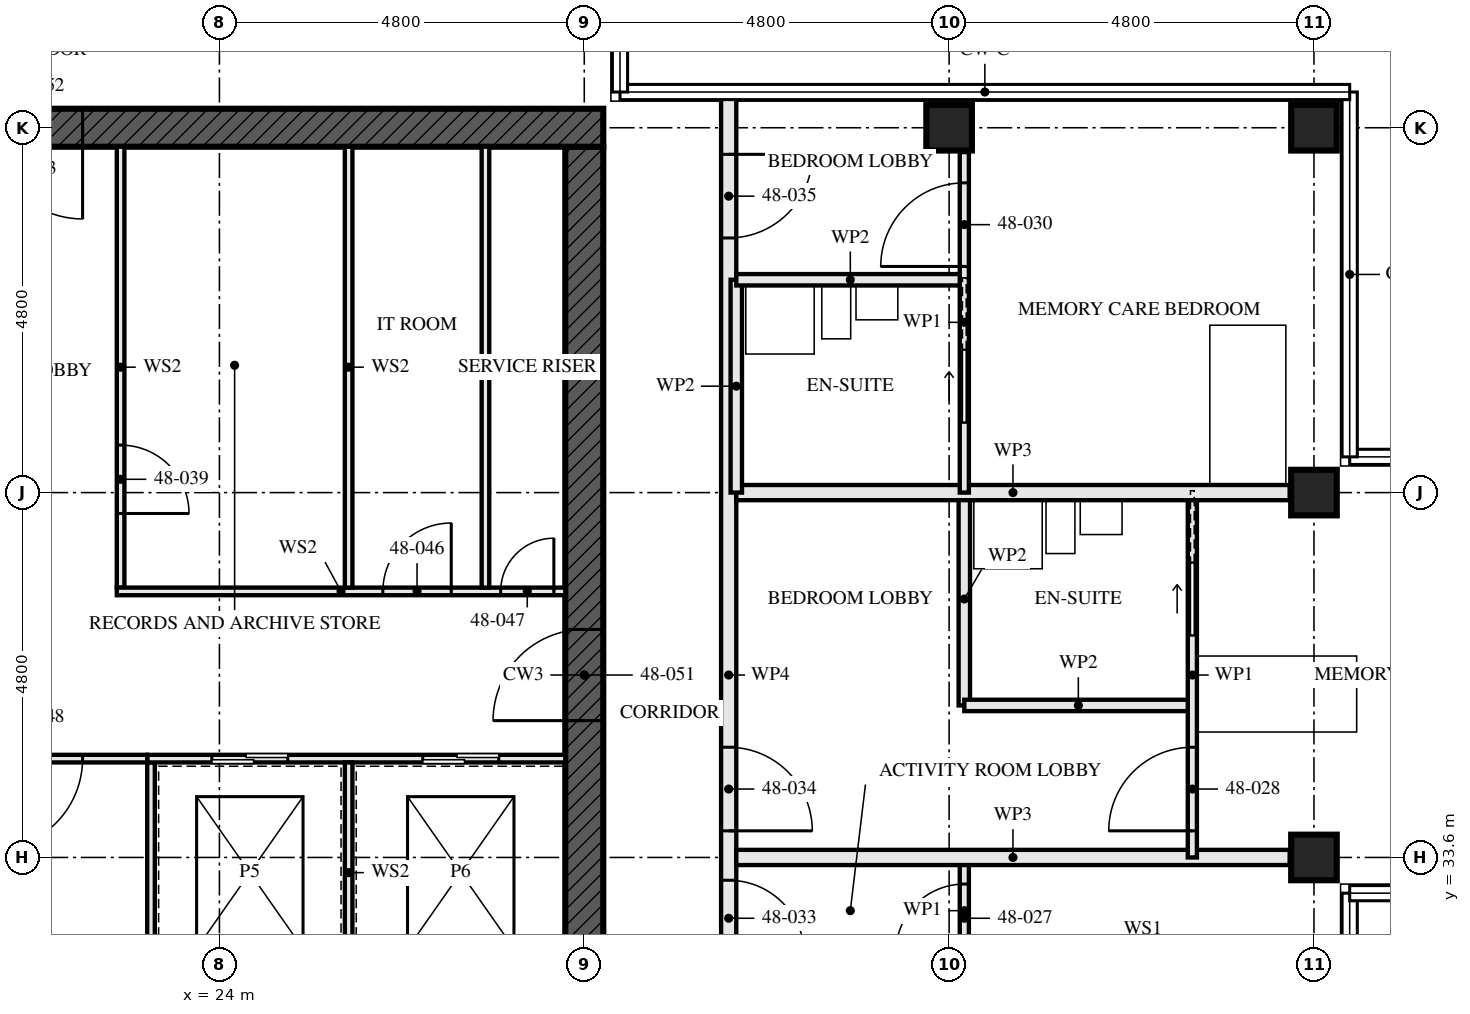
"""IFC4 building model, lengths in metres.
Left out: names, types, materials, properties, quantities, classifications, styles, units other than length and angle.
Written with IfcOpenShell. Run it as: python <this file> out.ifc"""

import sys

from ifc_helpers import new_model, si_unit, direction, frame, frame_2d, origin, origin_2d, place, context, subcontext, project, spatial, rectangle, hollow_rectangle, extrude, element, fill, save


model = new_model("IFC4")
c1 = context("Model", 3, precision=1e-05, world=origin(), true_north=direction((0.0, 1.0)))
c2 = subcontext(c1, "Body", "Model", "MODEL_VIEW")
j1 = project(units=[si_unit("LENGTHUNIT", "METRE"), si_unit("PLANEANGLEUNIT", "RADIAN")], contexts=[c1])
p1 = place(None, origin())
s1 = spatial("IfcSite", under=j1, at=p1, CompositionType="ELEMENT")
p2 = place(p1, origin())
s2 = spatial("IfcBuilding", under=s1, at=p2, CompositionType="ELEMENT")
p3 = place(p2, frame((0.0, 0.0, 176.0)))
s3 = spatial("IfcBuildingStorey", under=s2, at=p3, CompositionType="ELEMENT", Elevation=176.0)
for number, where, z_axis, x_axis in (
    (1, (33.6, 43.2, 0.0), (0.0, 0.0, 1.0), (0.0, 1.0, 0.0)),
    (2, (38.4, 33.6, 0.0), (0.0, 0.0, 1.0), (0.0, 1.0, 0.0)),
    (3, (38.4, 38.4, 0.0), (0.0, 0.0, 1.0), (0.0, 1.0, 0.0)),
    (4, (38.4, 43.2, 0.0), (0.0, 0.0, 1.0), (0.0, 1.0, 0.0)),
):
    element("IfcColumn", number, at=place(p3, frame(where, z_axis=z_axis, x_axis=x_axis)), inside=s3, PredefinedType="COLUMN", context=c2, shape_type="SweptSolid", body=[
        extrude(hollow_rectangle(XDim=0.6, YDim=0.6, WallThickness=0.08, at=origin_2d()), origin(), (0.0, 0.0, 1.0), 3.5),
    ])
p4 = place(p3, frame((29.05, 43.2, -0.17), z_axis=(0.0, 0.0, 1.0), x_axis=(-1.0, 0.0, 0.0)))
e5 = element("IfcWall", 5, at=p4, inside=s3, PredefinedType="SHEAR", context=c2, shape_type="SweptSolid", body=[
    extrude(rectangle(XDim=14.9, YDim=0.5, at=frame_2d((7.45, 0.0))), origin(), (0.0, 0.0, 1.0), 3.5),
])
p5 = place(p4, frame((6.85, 0.0, 0.17)))
e6 = element("IfcOpeningElement", 6, at=p5, cuts=e5, PredefinedType="OPENING", context=c2, shape_type="SweptSolid", body=[
    extrude(rectangle(XDim=1.2, YDim=2.1, at=frame_2d((0.6, 1.05))), frame((0.0, 0.26, 0.0), z_axis=(0.0, -1.0, 0.0), x_axis=(1.0, 0.0, 0.0)), (0.0, 0.0, 1.0), 0.521),
])
p6 = place(p3, frame((28.8, 29.05, -0.17), z_axis=(0.0, 0.0, 1.0), x_axis=(0.0, 1.0, 0.0)))
e7 = element("IfcWall", 7, at=p6, inside=s3, PredefinedType="SHEAR", context=c2, shape_type="SweptSolid", body=[
    extrude(rectangle(XDim=13.9, YDim=0.5, at=frame_2d((6.95, 0.0))), origin(), (0.0, 0.0, 1.0), 3.5),
])
p7 = place(p6, frame((6.35, 0.0, 0.17)))
e8 = element("IfcOpeningElement", 8, at=p7, cuts=e7, PredefinedType="OPENING", context=c2, shape_type="SweptSolid", body=[
    extrude(rectangle(XDim=1.2, YDim=2.1, at=frame_2d((0.6, 1.05))), frame((0.0, 0.26, 0.0), z_axis=(0.0, -1.0, 0.0), x_axis=(1.0, 0.0, 0.0)), (0.0, 0.0, 1.0), 0.521),
])
p8 = place(p3, frame((33.8, 32.2, 0.0), z_axis=(0.0, 0.0, 1.0), x_axis=(0.0, 1.0, 0.0)))
e9 = element("IfcWall", 9, at=p8, inside=s3, PredefinedType="PARTITIONING", context=c2, shape_type="SweptSolid", body=[
    extrude(rectangle(XDim=1.4, YDim=0.12, at=frame_2d((0.7, 0.0))), origin(), (0.0, 0.0, 1.0), 3.33),
])
p9 = place(p8, frame((0.15, 0.0, 0.0)))
e10 = element("IfcOpeningElement", 10, at=p9, cuts=e9, PredefinedType="OPENING", context=c2, shape_type="SweptSolid", body=[
    extrude(rectangle(XDim=0.9, YDim=2.1, at=frame_2d((0.45, 1.05))), frame((0.0, 0.071, 0.0), z_axis=(0.0, -1.0, 0.0), x_axis=(1.0, 0.0, 0.0)), (0.0, 0.0, 1.0), 0.141),
])
p10 = place(p3, frame((38.08, 33.6, 0.0), z_axis=(0.0, 0.0, 1.0), x_axis=(-1.0, 0.0, 0.0)))
e11 = element("IfcWall", 11, at=p10, inside=s3, PredefinedType="PARTITIONING", context=c2, shape_type="SweptSolid", body=[
    extrude(rectangle(XDim=7.28, YDim=0.2, at=frame_2d((3.64, 0.0))), origin(), (0.0, 0.0, 1.0), 2.55),
])
p11 = place(p3, frame((36.8, 35.6, 0.0), z_axis=(0.0, 0.0, 1.0), x_axis=(-1.0, 0.0, 0.0)))
e12 = element("IfcWall", 12, at=p11, inside=s3, PredefinedType="PARTITIONING", context=c2, shape_type="SweptSolid", body=[
    extrude(rectangle(XDim=3.0, YDim=0.15, at=frame_2d((1.5, 0.0))), origin(), (0.0, 0.0, 1.0), 3.33),
])
p12 = place(p3, frame((33.8, 35.6, 0.0), z_axis=(0.0, 0.0, 1.0), x_axis=(0.0, 1.0, 0.0)))
e13 = element("IfcWall", 13, at=p12, inside=s3, PredefinedType="PARTITIONING", context=c2, shape_type="SweptSolid", body=[
    extrude(rectangle(XDim=2.8, YDim=0.15, at=frame_2d((1.4, 0.0))), origin(), (0.0, 0.0, 1.0), 3.33),
])
p13 = place(p3, frame((36.8, 33.6, 0.0), z_axis=(0.0, 0.0, 1.0), x_axis=(0.0, 1.0, 0.0)))
e14 = element("IfcWall", 14, at=p13, inside=s3, PredefinedType="PARTITIONING", context=c2, shape_type="SweptSolid", body=[
    extrude(rectangle(XDim=4.8, YDim=0.12, at=frame_2d((2.4, 0.0))), origin(), (0.0, 0.0, 1.0), 3.33),
])
p14 = place(p13, frame((0.35, 0.0, 0.0)))
e15 = element("IfcOpeningElement", 15, at=p14, cuts=e14, PredefinedType="OPENING", context=c2, shape_type="SweptSolid", body=[
    extrude(rectangle(XDim=1.1, YDim=2.1, at=frame_2d((0.55, 1.05))), frame((0.0, 0.071, 0.0), z_axis=(0.0, -1.0, 0.0), x_axis=(1.0, 0.0, 0.0)), (0.0, 0.0, 1.0), 0.141),
])
p15 = place(p13, frame((2.925, 0.0, 0.0)))
e16 = element("IfcOpeningElement", 16, at=p15, cuts=e14, PredefinedType="OPENING", context=c2, shape_type="SweptSolid", body=[
    extrude(rectangle(XDim=0.95, YDim=2.1, at=frame_2d((0.475, 1.05))), frame((0.0, 0.071, 0.0), z_axis=(0.0, -1.0, 0.0), x_axis=(1.0, 0.0, 0.0)), (0.0, 0.0, 1.0), 0.141),
])
p16 = place(p3, frame((38.08, 38.4, 0.0), z_axis=(0.0, 0.0, 1.0), x_axis=(-1.0, 0.0, 0.0)))
e17 = element("IfcWall", 17, at=p16, inside=s3, PredefinedType="PARTITIONING", context=c2, shape_type="SweptSolid", body=[
    extrude(rectangle(XDim=7.28, YDim=0.2, at=frame_2d((3.64, 0.0))), origin(), (0.0, 0.0, 1.0), 2.55),
])
p17 = place(p3, frame((33.8, 41.2, 0.0), z_axis=(0.0, 0.0, 1.0), x_axis=(-1.0, 0.0, 0.0)))
e18 = element("IfcWall", 18, at=p17, inside=s3, PredefinedType="PARTITIONING", context=c2, shape_type="SweptSolid", body=[
    extrude(rectangle(XDim=3.0, YDim=0.15, at=frame_2d((1.5, 0.0))), origin(), (0.0, 0.0, 1.0), 3.33),
])
p18 = place(p3, frame((30.8, 38.4, 0.0), z_axis=(0.0, 0.0, 1.0), x_axis=(0.0, 1.0, 0.0)))
e19 = element("IfcWall", 19, at=p18, inside=s3, PredefinedType="PARTITIONING", context=c2, shape_type="SweptSolid", body=[
    extrude(rectangle(XDim=2.8, YDim=0.15, at=frame_2d((1.4, 0.0))), origin(), (0.0, 0.0, 1.0), 3.33),
])
p19 = place(p3, frame((33.8, 38.4, 0.0), z_axis=(0.0, 0.0, 1.0), x_axis=(0.0, 1.0, 0.0)))
e20 = element("IfcWall", 20, at=p19, inside=s3, PredefinedType="PARTITIONING", context=c2, shape_type="SweptSolid", body=[
    extrude(rectangle(XDim=4.48, YDim=0.12, at=frame_2d((2.24, 0.0))), origin(), (0.0, 0.0, 1.0), 3.33),
])
p20 = place(p19, frame((2.975, 0.0, 0.0)))
e21 = element("IfcOpeningElement", 21, at=p20, cuts=e20, PredefinedType="OPENING", context=c2, shape_type="SweptSolid", body=[
    extrude(rectangle(XDim=1.1, YDim=2.1, at=frame_2d((0.55, 1.05))), frame((0.0, 0.071, 0.0), z_axis=(0.0, -1.0, 0.0), x_axis=(1.0, 0.0, 0.0)), (0.0, 0.0, 1.0), 0.141),
])
p21 = place(p19, frame((0.925, 0.0, 0.0)))
e22 = element("IfcOpeningElement", 22, at=p21, cuts=e20, PredefinedType="OPENING", context=c2, shape_type="SweptSolid", body=[
    extrude(rectangle(XDim=0.95, YDim=2.1, at=frame_2d((0.475, 1.05))), frame((0.0, 0.071, 0.0), z_axis=(0.0, -1.0, 0.0), x_axis=(1.0, 0.0, 0.0)), (0.0, 0.0, 1.0), 0.141),
])
p22 = place(p3, frame((30.7, 28.35, 0.0), z_axis=(0.0, 0.0, 1.0), x_axis=(0.0, 1.0, 0.0)))
e23 = element("IfcWall", 23, at=p22, inside=s3, PredefinedType="PARTITIONING", context=c2, shape_type="SweptSolid", body=[
    extrude(rectangle(XDim=15.3, YDim=0.2, at=frame_2d((7.65, 0.0))), origin(), (0.0, 0.0, 1.0), 2.32),
])
p23 = place(p22, frame((1.85, 0.0, 0.0)))
e24 = element("IfcOpeningElement", 24, at=p23, cuts=e23, PredefinedType="OPENING", context=c2, shape_type="SweptSolid", body=[
    extrude(rectangle(XDim=1.0, YDim=2.1, at=frame_2d((0.5, 1.05))), frame((0.0, 0.111, 0.0), z_axis=(0.0, -1.0, 0.0), x_axis=(1.0, 0.0, 0.0)), (0.0, 0.0, 1.0), 0.221),
])
p24 = place(p22, frame((3.95, 0.0, 0.0)))
e25 = element("IfcOpeningElement", 25, at=p24, cuts=e23, PredefinedType="OPENING", context=c2, shape_type="SweptSolid", body=[
    extrude(rectangle(XDim=1.0, YDim=2.1, at=frame_2d((0.5, 1.05))), frame((0.0, 0.111, 0.0), z_axis=(0.0, -1.0, 0.0), x_axis=(1.0, 0.0, 0.0)), (0.0, 0.0, 1.0), 0.221),
])
p25 = place(p22, frame((5.6, 0.0, 0.0)))
e26 = element("IfcOpeningElement", 26, at=p25, cuts=e23, PredefinedType="OPENING", context=c2, shape_type="SweptSolid", body=[
    extrude(rectangle(XDim=1.1, YDim=2.1, at=frame_2d((0.55, 1.05))), frame((0.0, 0.111, 0.0), z_axis=(0.0, -1.0, 0.0), x_axis=(1.0, 0.0, 0.0)), (0.0, 0.0, 1.0), 0.221),
])
p26 = place(p22, frame((13.4, 0.0, 0.0)))
e27 = element("IfcOpeningElement", 27, at=p26, cuts=e23, PredefinedType="OPENING", context=c2, shape_type="SweptSolid", body=[
    extrude(rectangle(XDim=1.1, YDim=2.1, at=frame_2d((0.55, 1.05))), frame((0.0, 0.111, 0.0), z_axis=(0.0, -1.0, 0.0), x_axis=(1.0, 0.0, 0.0)), (0.0, 0.0, 1.0), 0.221),
])
p27 = place(p3, frame((27.5, 37.15, 0.0), z_axis=(0.0, 0.0, 1.0), x_axis=(0.0, 1.0, 0.0)))
e28 = element("IfcWall", 28, at=p27, inside=s3, PredefinedType="SOLIDWALL", context=c2, shape_type="SweptSolid", body=[
    extrude(rectangle(XDim=5.8, YDim=0.1, at=frame_2d((2.9, 0.0))), origin(), (0.0, 0.0, 1.0), 3.33),
])
p28 = place(p3, frame((22.7, 37.15, 0.0), z_axis=(0.0, 0.0, 1.0), x_axis=(0.0, 1.0, 0.0)))
e29 = element("IfcWall", 29, at=p28, inside=s3, PredefinedType="SOLIDWALL", context=c2, shape_type="SweptSolid", body=[
    extrude(rectangle(XDim=5.8, YDim=0.1, at=frame_2d((2.9, 0.0))), origin(), (0.0, 0.0, 1.0), 3.33),
])
p29 = place(p28, frame((0.975, 0.0, 0.0)))
e30 = element("IfcOpeningElement", 30, at=p29, cuts=e29, PredefinedType="OPENING", context=c2, shape_type="SweptSolid", body=[
    extrude(rectangle(XDim=0.9, YDim=2.1, at=frame_2d((0.45, 1.05))), frame((0.0, 0.061, 0.0), z_axis=(0.0, -1.0, 0.0), x_axis=(1.0, 0.0, 0.0)), (0.0, 0.0, 1.0), 0.121),
])
p30 = place(p3, frame((23.1, 29.05, 0.0), z_axis=(0.0, 0.0, 1.0), x_axis=(0.0, 1.0, 0.0)))
e31 = element("IfcWall", 31, at=p30, inside=s3, PredefinedType="SOLIDWALL", context=c2, shape_type="SweptSolid", body=[
    extrude(rectangle(XDim=5.8, YDim=0.1, at=frame_2d((2.9, 0.0))), origin(), (0.0, 0.0, 1.0), 3.33),
])
p31 = place(p30, frame((1.0, 0.0, 0.0)))
e32 = element("IfcOpeningElement", 32, at=p31, cuts=e31, PredefinedType="OPENING", context=c2, shape_type="SweptSolid", body=[
    extrude(rectangle(XDim=0.7, YDim=2.1, at=frame_2d((0.35, 1.05))), frame((0.0, 0.061, 0.0), z_axis=(0.0, -1.0, 0.0), x_axis=(1.0, 0.0, 0.0)), (0.0, 0.0, 1.0), 0.121),
])
p32 = place(p3, frame((23.05, 34.9, 0.0), z_axis=(0.0, 0.0, 1.0), x_axis=(1.0, 0.0, 0.0)))
e33 = element("IfcWall", 33, at=p32, inside=s3, PredefinedType="SOLIDWALL", context=c2, shape_type="SweptSolid", body=[
    extrude(rectangle(XDim=5.5, YDim=0.1, at=frame_2d((2.75, 0.0))), origin(), (0.0, 0.0, 1.0), 3.33),
])
p33 = place(p32, frame((0.85, 0.0, 0.0)))
e34 = element("IfcOpeningElement", 34, at=p33, cuts=e33, PredefinedType="OPENING", context=c2, shape_type="SweptSolid", body=[
    extrude(rectangle(XDim=1.0, YDim=2.1, at=frame_2d((0.5, 1.05))), frame((0.0, 0.061, 0.0), z_axis=(0.0, -1.0, 0.0), x_axis=(1.0, 0.0, 0.0)), (0.0, 0.0, 1.0), 0.121),
])
p34 = place(p32, frame((3.625, 0.0, 0.0)))
e35 = element("IfcOpeningElement", 35, at=p34, cuts=e33, PredefinedType="OPENING", context=c2, shape_type="SweptSolid", body=[
    extrude(rectangle(XDim=1.0, YDim=2.1, at=frame_2d((0.5, 1.05))), frame((0.0, 0.061, 0.0), z_axis=(0.0, -1.0, 0.0), x_axis=(1.0, 0.0, 0.0)), (0.0, 0.0, 1.0), 0.121),
])
p35 = place(p3, frame((22.65, 37.1, 0.0), z_axis=(0.0, 0.0, 1.0), x_axis=(1.0, 0.0, 0.0)))
e36 = element("IfcWall", 36, at=p35, inside=s3, PredefinedType="SOLIDWALL", context=c2, shape_type="SweptSolid", body=[
    extrude(rectangle(XDim=5.9, YDim=0.1, at=frame_2d((2.95, 0.0))), origin(), (0.0, 0.0, 1.0), 3.33),
])
p36 = place(p35, frame((3.5, 0.0, 0.0)))
e37 = element("IfcOpeningElement", 37, at=p36, cuts=e36, PredefinedType="OPENING", context=c2, shape_type="SweptSolid", body=[
    extrude(rectangle(XDim=0.9, YDim=2.1, at=frame_2d((0.45, 1.05))), frame((0.0, 0.061, 0.0), z_axis=(0.0, -1.0, 0.0), x_axis=(1.0, 0.0, 0.0)), (0.0, 0.0, 1.0), 0.121),
])
p37 = place(p35, frame((5.05, 0.0, 0.0)))
e38 = element("IfcOpeningElement", 38, at=p37, cuts=e36, PredefinedType="OPENING", context=c2, shape_type="SweptSolid", body=[
    extrude(rectangle(XDim=0.7, YDim=2.1, at=frame_2d((0.35, 1.05))), frame((0.0, 0.061, 0.0), z_axis=(0.0, -1.0, 0.0), x_axis=(1.0, 0.0, 0.0)), (0.0, 0.0, 1.0), 0.121),
])
p38 = place(p3, frame((20.55, 34.9, 0.0), z_axis=(0.0, 0.0, 1.0), x_axis=(1.0, 0.0, 0.0)))
e39 = element("IfcWall", 39, at=p38, inside=s3, PredefinedType="SOLIDWALL", context=c2, shape_type="SweptSolid", body=[
    extrude(rectangle(XDim=2.5, YDim=0.1, at=frame_2d((1.25, 0.0))), origin(), (0.0, 0.0, 1.0), 3.33),
])
p39 = place(p38, frame((0.45, 0.0, 0.0)))
e40 = element("IfcOpeningElement", 40, at=p39, cuts=e39, PredefinedType="OPENING", context=c2, shape_type="SweptSolid", body=[
    extrude(rectangle(XDim=1.2, YDim=2.1, at=frame_2d((0.6, 1.05))), frame((0.0, 0.061, 0.0), z_axis=(0.0, -1.0, 0.0), x_axis=(1.0, 0.0, 0.0)), (0.0, 0.0, 1.0), 0.121),
])
p40 = place(p3, frame((25.7, 37.15, 0.0), z_axis=(0.0, 0.0, 1.0), x_axis=(0.0, 1.0, 0.0)))
e41 = element("IfcWall", 41, at=p40, inside=s3, PredefinedType="SOLIDWALL", context=c2, shape_type="SweptSolid", body=[
    extrude(rectangle(XDim=5.8, YDim=0.1, at=frame_2d((2.9, 0.0))), origin(), (0.0, 0.0, 1.0), 3.33),
])
p41 = place(p3, frame((25.7, 31.95, 0.0), z_axis=(0.0, 0.0, 1.0), x_axis=(0.0, 1.0, 0.0)))
e42 = element("IfcWall", 42, at=p41, inside=s3, PredefinedType="SOLIDWALL", context=c2, shape_type="SweptSolid", body=[
    extrude(rectangle(XDim=2.9, YDim=0.1, at=frame_2d((1.45, 0.0))), origin(), (0.0, 0.0, 1.0), 3.33),
])
p42 = place(p9, origin())
e43 = element("IfcDoor", 43, at=p42, inside=s3, OperationType="SINGLE_SWING_RIGHT", PredefinedType="DOOR", context=c2, shape_type="SweptSolid", body=[
    extrude(rectangle(XDim=0.9, YDim=2.1, at=frame_2d((0.45, 1.05))), frame((0.0, 0.022, 0.0), z_axis=(0.0, -1.0, 0.0), x_axis=(1.0, 0.0, 0.0)), (0.0, 0.0, 1.0), 0.044),
])
fill(e10, e43)
p43 = place(p14, origin())
e44 = element("IfcDoor", 44, at=p43, inside=s3, OperationType="SINGLE_SWING_RIGHT", PredefinedType="DOOR", context=c2, shape_type="SweptSolid", body=[
    extrude(rectangle(XDim=1.1, YDim=2.1, at=frame_2d((0.55, 1.05))), frame((0.0, 0.022, 0.0), z_axis=(0.0, -1.0, 0.0), x_axis=(1.0, 0.0, 0.0)), (0.0, 0.0, 1.0), 0.044),
])
fill(e15, e44)
p44 = place(p15, origin())
e45 = element("IfcDoor", 45, at=p44, inside=s3, OperationType="SLIDING_TO_LEFT", PredefinedType="DOOR", context=c2, shape_type="SweptSolid", body=[
    extrude(rectangle(XDim=0.95, YDim=2.1, at=frame_2d((0.475, 1.05))), frame((0.0, 0.022, 0.0), z_axis=(0.0, -1.0, 0.0), x_axis=(1.0, 0.0, 0.0)), (0.0, 0.0, 1.0), 0.044),
])
fill(e16, e45)
p45 = place(p20, origin())
e46 = element("IfcDoor", 46, at=p45, inside=s3, OperationType="SINGLE_SWING_RIGHT", PredefinedType="DOOR", context=c2, shape_type="SweptSolid", body=[
    extrude(rectangle(XDim=1.1, YDim=2.1, at=frame_2d((0.55, 1.05))), frame((0.0, 0.022, 0.0), z_axis=(0.0, -1.0, 0.0), x_axis=(1.0, 0.0, 0.0)), (0.0, 0.0, 1.0), 0.044),
])
fill(e21, e46)
p46 = place(p21, origin())
e47 = element("IfcDoor", 47, at=p46, inside=s3, OperationType="SLIDING_TO_LEFT", PredefinedType="DOOR", context=c2, shape_type="SweptSolid", body=[
    extrude(rectangle(XDim=0.95, YDim=2.1, at=frame_2d((0.475, 1.05))), frame((0.0, 0.022, 0.0), z_axis=(0.0, -1.0, 0.0), x_axis=(1.0, 0.0, 0.0)), (0.0, 0.0, 1.0), 0.044),
])
fill(e22, e47)
p47 = place(p24, frame((1.0, 0.0, 0.0), z_axis=(0.0, 0.0, 1.0), x_axis=(-1.0, 0.0, 0.0)))
e48 = element("IfcDoor", 48, at=p47, inside=s3, OperationType="SINGLE_SWING_LEFT", PredefinedType="DOOR", context=c2, shape_type="SweptSolid", body=[
    extrude(rectangle(XDim=1.0, YDim=2.1, at=frame_2d((0.5, 1.05))), frame((0.0, 0.027, 0.0), z_axis=(0.0, -1.0, 0.0), x_axis=(1.0, 0.0, 0.0)), (0.0, 0.0, 1.0), 0.054),
])
fill(e25, e48)
p48 = place(p25, frame((1.1, 0.0, 0.0), z_axis=(0.0, 0.0, 1.0), x_axis=(-1.0, 0.0, 0.0)))
e49 = element("IfcDoor", 49, at=p48, inside=s3, OperationType="SINGLE_SWING_LEFT", PredefinedType="DOOR", context=c2, shape_type="SweptSolid", body=[
    extrude(rectangle(XDim=1.1, YDim=2.1, at=frame_2d((0.55, 1.05))), frame((0.0, 0.027, 0.0), z_axis=(0.0, -1.0, 0.0), x_axis=(1.0, 0.0, 0.0)), (0.0, 0.0, 1.0), 0.054),
])
fill(e26, e49)
p49 = place(p26, frame((1.1, 0.0, 0.0), z_axis=(0.0, 0.0, 1.0), x_axis=(-1.0, 0.0, 0.0)))
e50 = element("IfcDoor", 50, at=p49, inside=s3, OperationType="SINGLE_SWING_RIGHT", PredefinedType="DOOR", context=c2, shape_type="SweptSolid", body=[
    extrude(rectangle(XDim=1.1, YDim=2.1, at=frame_2d((0.55, 1.05))), frame((0.0, 0.027, 0.0), z_axis=(0.0, -1.0, 0.0), x_axis=(1.0, 0.0, 0.0)), (0.0, 0.0, 1.0), 0.054),
])
fill(e27, e50)
p50 = place(p29, frame((0.9, 0.0, 0.0), z_axis=(0.0, 0.0, 1.0), x_axis=(-1.0, 0.0, 0.0)))
e51 = element("IfcDoor", 51, at=p50, inside=s3, OperationType="SINGLE_SWING_LEFT", PredefinedType="DOOR", context=c2, shape_type="SweptSolid", body=[
    extrude(rectangle(XDim=0.9, YDim=2.1, at=frame_2d((0.45, 1.05))), frame((0.0, 0.027, 0.0), z_axis=(0.0, -1.0, 0.0), x_axis=(1.0, 0.0, 0.0)), (0.0, 0.0, 1.0), 0.054),
])
fill(e30, e51)
p51 = place(p33, origin())
e52 = element("IfcDoor", 52, at=p51, inside=s3, OperationType="SLIDING_TO_LEFT", PredefinedType="DOOR", context=c2, shape_type="SweptSolid", body=[
    extrude(rectangle(XDim=1.0, YDim=2.1, at=frame_2d((0.5, 1.05))), frame((0.0, 0.05, 0.0), z_axis=(0.0, -1.0, 0.0), x_axis=(1.0, 0.0, 0.0)), (0.0, 0.0, 1.0), 0.1),
])
fill(e34, e52)
p52 = place(p34, origin())
e53 = element("IfcDoor", 53, at=p52, inside=s3, OperationType="SLIDING_TO_LEFT", PredefinedType="DOOR", context=c2, shape_type="SweptSolid", body=[
    extrude(rectangle(XDim=1.0, YDim=2.1, at=frame_2d((0.5, 1.05))), frame((0.0, 0.05, 0.0), z_axis=(0.0, -1.0, 0.0), x_axis=(1.0, 0.0, 0.0)), (0.0, 0.0, 1.0), 0.1),
])
fill(e35, e53)
p53 = place(p36, origin())
e54 = element("IfcDoor", 54, at=p53, inside=s3, OperationType="SINGLE_SWING_LEFT", PredefinedType="DOOR", context=c2, shape_type="SweptSolid", body=[
    extrude(rectangle(XDim=0.9, YDim=2.1, at=frame_2d((0.45, 1.05))), frame((0.0, 0.027, 0.0), z_axis=(0.0, -1.0, 0.0), x_axis=(1.0, 0.0, 0.0)), (0.0, 0.0, 1.0), 0.054),
])
fill(e37, e54)
p54 = place(p37, origin())
e55 = element("IfcDoor", 55, at=p54, inside=s3, OperationType="SINGLE_SWING_LEFT", PredefinedType="DOOR", context=c2, shape_type="SweptSolid", body=[
    extrude(rectangle(XDim=0.7, YDim=2.1, at=frame_2d((0.35, 1.05))), frame((0.0, 0.027, 0.0), z_axis=(0.0, -1.0, 0.0), x_axis=(1.0, 0.0, 0.0)), (0.0, 0.0, 1.0), 0.054),
])
fill(e38, e55)
p55 = place(p39, frame((1.2, 0.0, 0.0), z_axis=(0.0, 0.0, 1.0), x_axis=(-1.0, 0.0, 0.0)))
e56 = element("IfcDoor", 56, at=p55, inside=s3, OperationType="SINGLE_SWING_LEFT", PredefinedType="DOOR", context=c2, shape_type="SweptSolid", body=[
    extrude(rectangle(XDim=1.2, YDim=2.1, at=frame_2d((0.6, 1.05))), frame((0.0, 0.027, 0.0), z_axis=(0.0, -1.0, 0.0), x_axis=(1.0, 0.0, 0.0)), (0.0, 0.0, 1.0), 0.054),
])
fill(e40, e56)
p56 = place(p7, origin())
e57 = element("IfcDoor", 57, at=p56, inside=s3, OperationType="SINGLE_SWING_LEFT", PredefinedType="DOOR", context=c2, shape_type="SweptSolid", body=[
    extrude(rectangle(XDim=1.2, YDim=2.1, at=frame_2d((0.6, 1.05))), frame((0.0, 0.027, 0.0), z_axis=(0.0, -1.0, 0.0), x_axis=(1.0, 0.0, 0.0)), (0.0, 0.0, 1.0), 0.054),
])
fill(e8, e57)
p57 = place(p5, origin())
e58 = element("IfcDoor", 58, at=p57, inside=s3, OperationType="SINGLE_SWING_LEFT", PredefinedType="DOOR", context=c2, shape_type="SweptSolid", body=[
    extrude(rectangle(XDim=1.2, YDim=2.1, at=frame_2d((0.6, 1.05))), frame((0.0, 0.027, 0.0), z_axis=(0.0, -1.0, 0.0), x_axis=(1.0, 0.0, 0.0)), (0.0, 0.0, 1.0), 0.054),
])
fill(e6, e58)
save(model, sys.argv[1])
